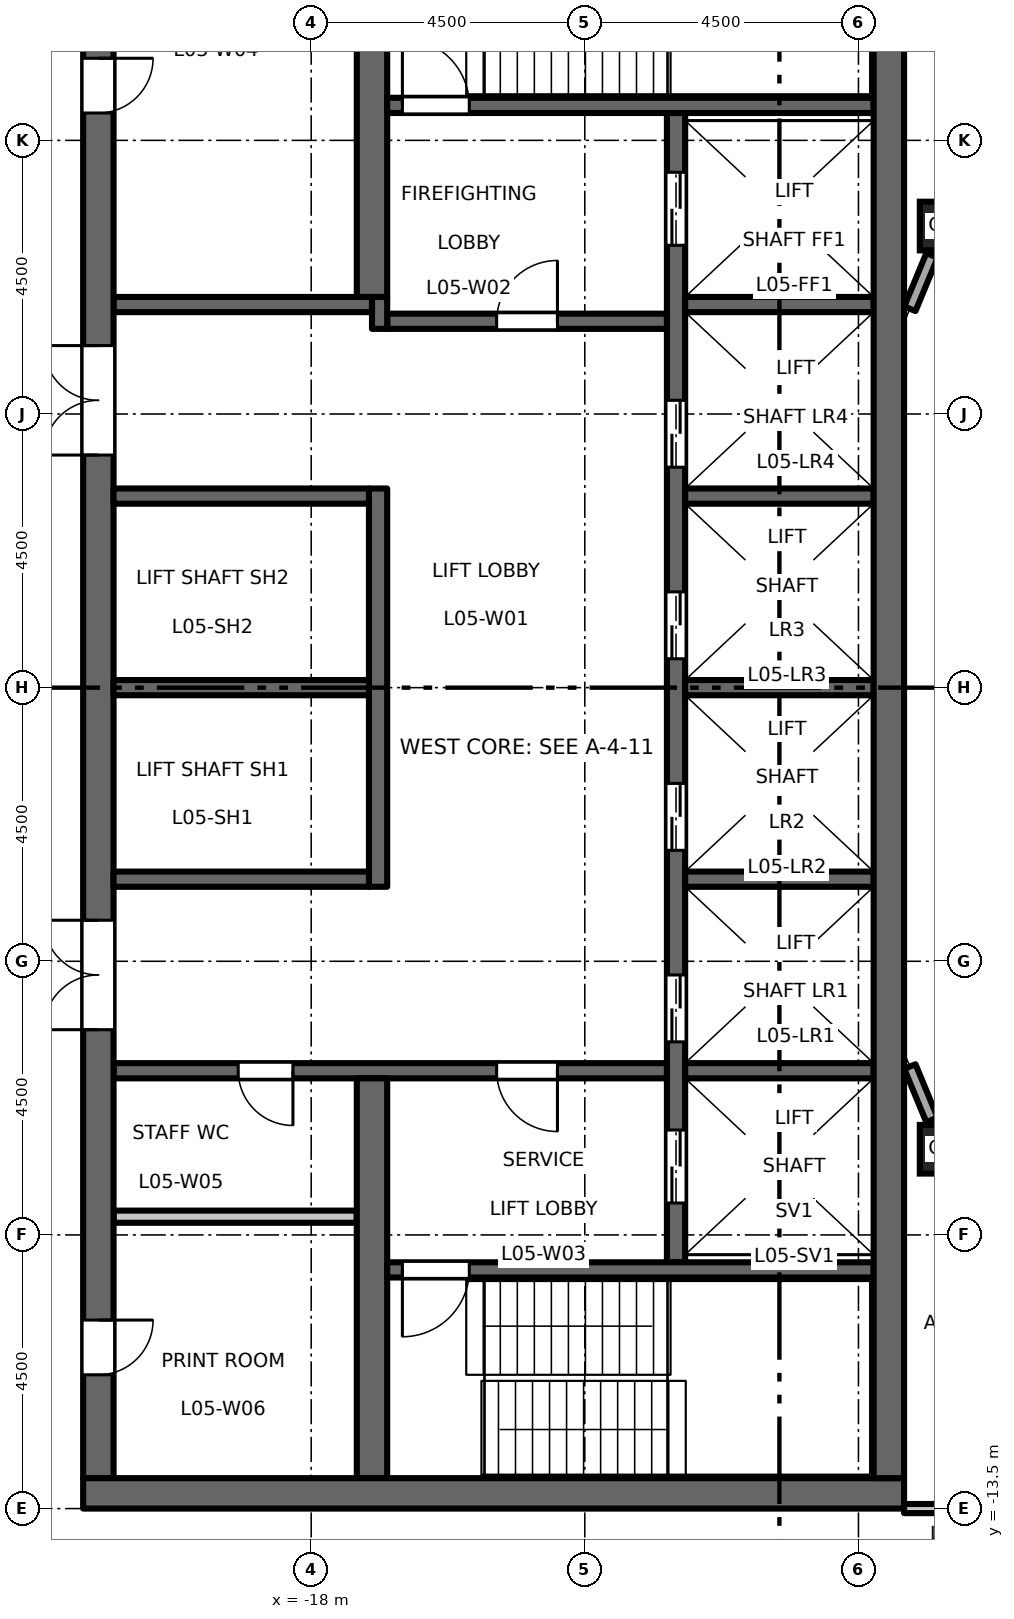
"""IFC4 building model, lengths in metres.
Left out: names, types, materials, properties, quantities, classifications, styles, units other than length and angle.
Written with IfcOpenShell. Run it as: python <this file> out.ifc"""

import sys

from ifc_helpers import new_model, si_unit, direction, frame, frame_2d, origin, origin_2d, place, context, subcontext, project, spatial, rectangle, hollow_rectangle, extrude, element, fill, save


model = new_model("IFC4")
c1 = context("Model", 3, precision=1e-05, world=origin(), true_north=direction((0.0, 1.0)))
c2 = subcontext(c1, "Body", "Model", "MODEL_VIEW")
j1 = project(units=[si_unit("LENGTHUNIT", "METRE"), si_unit("PLANEANGLEUNIT", "RADIAN")], contexts=[c1])
p1 = place(None, origin())
s1 = spatial("IfcSite", under=j1, at=p1, CompositionType="ELEMENT")
p2 = place(p1, origin())
s2 = spatial("IfcBuilding", under=s1, at=p2, CompositionType="ELEMENT")
p3 = place(p2, frame((0.0, 0.0, 26.7)))
s3 = spatial("IfcBuildingStorey", under=s2, at=p3, CompositionType="ELEMENT", Elevation=26.7)
for number, where, z_axis, x_axis in (
    (1, (-7.591, -7.591, 0.0), (0.0, 0.0, 1.0), (1.0, 0.0, 0.0)),
    (2, (-7.591, 7.591, 0.0), (0.0, 0.0, 1.0), (1.0, 0.0, 0.0)),
):
    element("IfcColumn", number, at=place(p3, frame(where, z_axis=z_axis, x_axis=x_axis)), inside=s3, PredefinedType="COLUMN", context=c2, shape_type="SweptSolid", body=[
        extrude(hollow_rectangle(XDim=0.8, YDim=0.8, WallThickness=0.05, at=origin_2d()), origin(), (0.0, 0.0, 1.0), 4.5),
    ])
p4 = place(p3, frame((-12.0, -9.45, 0.0), z_axis=(0.0, 0.0, 1.0), x_axis=(0.0, 1.0, 0.0)))
e3 = element("IfcWall", 3, at=p4, inside=s3, PredefinedType="SHEAR", context=c2, shape_type="SweptSolid", body=[
    extrude(rectangle(XDim=18.9, YDim=0.3, at=frame_2d((9.45, 0.0))), origin(), (0.0, 0.0, 1.0), 4.35),
])
p5 = place(p4, frame((3.625, 0.0, 0.0)))
e4 = element("IfcOpeningElement", 4, at=p5, cuts=e3, PredefinedType="OPENING", context=c2, shape_type="SweptSolid", body=[
    extrude(rectangle(XDim=1.1, YDim=2.1, at=frame_2d((0.55, 1.05))), frame((0.0, 0.16, 0.0), z_axis=(0.0, -1.0, 0.0), x_axis=(1.0, 0.0, 0.0)), (0.0, 0.0, 1.0), 0.32),
])
p6 = place(p4, frame((6.775, 0.0, 0.0)))
e5 = element("IfcOpeningElement", 5, at=p6, cuts=e3, PredefinedType="OPENING", context=c2, shape_type="SweptSolid", body=[
    extrude(rectangle(XDim=1.1, YDim=2.1, at=frame_2d((0.55, 1.05))), frame((0.0, 0.16, 0.0), z_axis=(0.0, -1.0, 0.0), x_axis=(1.0, 0.0, 0.0)), (0.0, 0.0, 1.0), 0.32),
])
p7 = place(p4, frame((9.925, 0.0, 0.0)))
e6 = element("IfcOpeningElement", 6, at=p7, cuts=e3, PredefinedType="OPENING", context=c2, shape_type="SweptSolid", body=[
    extrude(rectangle(XDim=1.1, YDim=2.1, at=frame_2d((0.55, 1.05))), frame((0.0, 0.16, 0.0), z_axis=(0.0, -1.0, 0.0), x_axis=(1.0, 0.0, 0.0)), (0.0, 0.0, 1.0), 0.32),
])
p8 = place(p4, frame((13.075, 0.0, 0.0)))
e7 = element("IfcOpeningElement", 7, at=p8, cuts=e3, PredefinedType="OPENING", context=c2, shape_type="SweptSolid", body=[
    extrude(rectangle(XDim=1.1, YDim=2.1, at=frame_2d((0.55, 1.05))), frame((0.0, 0.16, 0.0), z_axis=(0.0, -1.0, 0.0), x_axis=(1.0, 0.0, 0.0)), (0.0, 0.0, 1.0), 0.32),
])
p9 = place(p4, frame((16.725, 0.0, 0.0)))
e8 = element("IfcOpeningElement", 8, at=p9, cuts=e3, PredefinedType="OPENING", context=c2, shape_type="SweptSolid", body=[
    extrude(rectangle(XDim=1.2, YDim=2.1, at=frame_2d((0.6, 1.05))), frame((0.0, 0.16, 0.0), z_axis=(0.0, -1.0, 0.0), x_axis=(1.0, 0.0, 0.0)), (0.0, 0.0, 1.0), 0.32),
])
p10 = place(p4, frame((0.975, 0.0, 0.0)))
e9 = element("IfcOpeningElement", 9, at=p10, cuts=e3, PredefinedType="OPENING", context=c2, shape_type="SweptSolid", body=[
    extrude(rectangle(XDim=1.2, YDim=2.1, at=frame_2d((0.6, 1.05))), frame((0.0, 0.16, 0.0), z_axis=(0.0, -1.0, 0.0), x_axis=(1.0, 0.0, 0.0)), (0.0, 0.0, 1.0), 0.32),
])
p11 = place(p3, frame((-12.15, 6.025, 0.0), z_axis=(0.0, 0.0, 1.0), x_axis=(-1.0, 0.0, 0.0)))
e10 = element("IfcWall", 10, at=p11, inside=s3, PredefinedType="SHEAR", context=c2, shape_type="SweptSolid", body=[
    extrude(rectangle(XDim=4.6, YDim=0.25, at=frame_2d((2.3, 0.0))), origin(), (0.0, 0.0, 1.0), 4.35),
])
p12 = place(p11, frame((1.8, 0.0, 0.0)))
e11 = element("IfcOpeningElement", 11, at=p12, cuts=e10, PredefinedType="OPENING", context=c2, shape_type="SweptSolid", body=[
    extrude(rectangle(XDim=1.0, YDim=2.1, at=frame_2d((0.5, 1.05))), frame((0.0, 0.135, 0.0), z_axis=(0.0, -1.0, 0.0), x_axis=(1.0, 0.0, 0.0)), (0.0, 0.0, 1.0), 0.27),
])
p13 = place(p3, frame((-16.875, 5.9, 0.0), z_axis=(0.0, 0.0, 1.0), x_axis=(0.0, 1.0, 0.0)))
e12 = element("IfcWall", 12, at=p13, inside=s3, PredefinedType="SHEAR", context=c2, shape_type="SweptSolid", body=[
    extrude(rectangle(XDim=0.525, YDim=0.25, at=frame_2d((0.263, 0.0))), origin(), (0.0, 0.0, 1.0), 4.35),
])
p14 = place(p3, frame((-17.0, 6.3, 0.0), z_axis=(0.0, 0.0, 1.0), x_axis=(-1.0, 0.0, 0.0)))
e13 = element("IfcWall", 13, at=p14, inside=s3, PredefinedType="SHEAR", context=c2, shape_type="SweptSolid", body=[
    extrude(rectangle(XDim=4.25, YDim=0.25, at=frame_2d((2.125, 0.0))), origin(), (0.0, 0.0, 1.0), 4.35),
])
p15 = place(p3, frame((-12.15, -6.3, 0.0), z_axis=(0.0, 0.0, 1.0), x_axis=(-1.0, 0.0, 0.0)))
e14 = element("IfcWall", 14, at=p15, inside=s3, PredefinedType="SHEAR", context=c2, shape_type="SweptSolid", body=[
    extrude(rectangle(XDim=9.1, YDim=0.25, at=frame_2d((4.55, 0.0))), origin(), (0.0, 0.0, 1.0), 4.35),
])
p16 = place(p15, frame((1.8, 0.0, 0.0)))
e15 = element("IfcOpeningElement", 15, at=p16, cuts=e14, PredefinedType="OPENING", context=c2, shape_type="SweptSolid", body=[
    extrude(rectangle(XDim=1.0, YDim=2.1, at=frame_2d((0.5, 1.05))), frame((0.0, 0.135, 0.0), z_axis=(0.0, -1.0, 0.0), x_axis=(1.0, 0.0, 0.0)), (0.0, 0.0, 1.0), 0.27),
])
p17 = place(p15, frame((6.15, 0.0, 0.0)))
e16 = element("IfcOpeningElement", 16, at=p17, cuts=e14, PredefinedType="OPENING", context=c2, shape_type="SweptSolid", body=[
    extrude(rectangle(XDim=0.9, YDim=2.1, at=frame_2d((0.45, 1.05))), frame((0.0, 0.135, 0.0), z_axis=(0.0, -1.0, 0.0), x_axis=(1.0, 0.0, 0.0)), (0.0, 0.0, 1.0), 0.27),
])
p18 = place(p3, frame((-21.5, -13.0, 0.0), z_axis=(0.0, 0.0, 1.0), x_axis=(0.0, 1.0, 0.0)))
e17 = element("IfcWall", 17, at=p18, inside=s3, PredefinedType="SHEAR", context=c2, shape_type="SweptSolid", body=[
    extrude(rectangle(XDim=26.0, YDim=0.5, at=frame_2d((13.0, 0.0))), origin(), (0.0, 0.0, 1.0), 4.35),
])
p19 = place(p18, frame((16.825, 0.0, 0.0)))
e18 = element("IfcOpeningElement", 18, at=p19, cuts=e17, PredefinedType="OPENING", context=c2, shape_type="SweptSolid", body=[
    extrude(rectangle(XDim=1.8, YDim=2.1, at=frame_2d((0.9, 1.05))), frame((0.0, 0.26, 0.0), z_axis=(0.0, -1.0, 0.0), x_axis=(1.0, 0.0, 0.0)), (0.0, 0.0, 1.0), 0.52),
])
p20 = place(p18, frame((7.375, 0.0, 0.0)))
e19 = element("IfcOpeningElement", 19, at=p20, cuts=e17, PredefinedType="OPENING", context=c2, shape_type="SweptSolid", body=[
    extrude(rectangle(XDim=1.8, YDim=2.1, at=frame_2d((0.9, 1.05))), frame((0.0, 0.26, 0.0), z_axis=(0.0, -1.0, 0.0), x_axis=(1.0, 0.0, 0.0)), (0.0, 0.0, 1.0), 0.52),
])
p21 = place(p18, frame((22.45, 0.0, 0.0)))
e20 = element("IfcOpeningElement", 20, at=p21, cuts=e17, PredefinedType="OPENING", context=c2, shape_type="SweptSolid", body=[
    extrude(rectangle(XDim=0.9, YDim=2.1, at=frame_2d((0.45, 1.05))), frame((0.0, 0.26, 0.0), z_axis=(0.0, -1.0, 0.0), x_axis=(1.0, 0.0, 0.0)), (0.0, 0.0, 1.0), 0.52),
])
p22 = place(p18, frame((1.7, 0.0, 0.0)))
e21 = element("IfcOpeningElement", 21, at=p22, cuts=e17, PredefinedType="OPENING", context=c2, shape_type="SweptSolid", body=[
    extrude(rectangle(XDim=0.9, YDim=2.1, at=frame_2d((0.45, 1.05))), frame((0.0, 0.26, 0.0), z_axis=(0.0, -1.0, 0.0), x_axis=(1.0, 0.0, 0.0)), (0.0, 0.0, 1.0), 0.52),
])
p23 = place(p3, frame((-17.25, -8.7, 0.0), z_axis=(0.0, 0.0, 1.0), x_axis=(-1.0, 0.0, 0.0)))
e22 = element("IfcWall", 22, at=p23, inside=s3, PredefinedType="PARTITIONING", context=c2, shape_type="SweptSolid", body=[
    extrude(rectangle(XDim=4.0, YDim=0.2, at=frame_2d((2.0, 0.0))), origin(), (0.0, 0.0, 1.0), 4.35),
])
p24 = place(p3, frame((-16.9, -3.275, 0.0), z_axis=(0.0, 0.0, 1.0), x_axis=(0.0, 1.0, 0.0)))
e23 = element("IfcWall", 23, at=p24, inside=s3, PredefinedType="SHEAR", context=c2, shape_type="SweptSolid", body=[
    extrude(rectangle(XDim=6.55, YDim=0.3, at=frame_2d((3.275, 0.0))), origin(), (0.0, 0.0, 1.0), 4.35),
])
for number, where, z_axis, x_axis in (
    (24, (-17.05, 0.0, 0.0), (0.0, 0.0, 1.0), (-1.0, 0.0, 0.0)),
    (25, (-17.05, 3.15, 0.0), (0.0, 0.0, 1.0), (-1.0, 0.0, 0.0)),
    (26, (-17.05, -3.15, 0.0), (0.0, 0.0, 1.0), (-1.0, 0.0, 0.0)),
):
    element("IfcWall", number, at=place(p3, frame(where, z_axis=z_axis, x_axis=x_axis)), inside=s3, PredefinedType="SHEAR", context=c2, shape_type="SweptSolid", body=[
        extrude(rectangle(XDim=4.2, YDim=0.25, at=frame_2d((2.1, 0.0))), origin(), (0.0, 0.0, 1.0), 4.35),
    ])
for number, where, z_axis, x_axis in (
    (27, (-17.0, 6.425, 0.0), (0.0, 0.0, 1.0), (0.0, 1.0, 0.0)),
    (28, (-17.0, -13.0, 0.0), (0.0, 0.0, 1.0), (0.0, 1.0, 0.0)),
):
    element("IfcWall", number, at=place(p3, frame(where, z_axis=z_axis, x_axis=x_axis)), inside=s3, PredefinedType="SHEAR", context=c2, shape_type="SweptSolid", body=[
        extrude(rectangle(XDim=6.575, YDim=0.5, at=frame_2d((3.288, 0.0))), origin(), (0.0, 0.0, 1.0), 4.35),
    ])
for number, where, z_axis, x_axis in (
    (29, (-8.75, 0.0, 0.0), (0.0, 0.0, 1.0), (-1.0, 0.0, 0.0)),
    (30, (-8.75, 3.15, 0.0), (0.0, 0.0, 1.0), (-1.0, 0.0, 0.0)),
    (31, (-8.75, 6.3, 0.0), (0.0, 0.0, 1.0), (-1.0, 0.0, 0.0)),
    (32, (-8.75, -3.15, 0.0), (0.0, 0.0, 1.0), (-1.0, 0.0, 0.0)),
    (33, (-8.75, -6.3, 0.0), (0.0, 0.0, 1.0), (-1.0, 0.0, 0.0)),
):
    element("IfcWall", number, at=place(p3, frame(where, z_axis=z_axis, x_axis=x_axis)), inside=s3, PredefinedType="SHEAR", context=c2, shape_type="SweptSolid", body=[
        extrude(rectangle(XDim=3.1, YDim=0.25, at=frame_2d((1.55, 0.0))), origin(), (0.0, 0.0, 1.0), 4.35),
    ])
p25 = place(p3, frame((-8.75, 9.575, 0.0), z_axis=(0.0, 0.0, 1.0), x_axis=(-1.0, 0.0, 0.0)))
e34 = element("IfcWall", 34, at=p25, inside=s3, PredefinedType="SHEAR", context=c2, shape_type="SweptSolid", body=[
    extrude(rectangle(XDim=8.0, YDim=0.25, at=frame_2d((4.0, 0.0))), origin(), (0.0, 0.0, 1.0), 4.35),
])
p26 = place(p25, frame((6.65, 0.0, 0.0)))
e35 = element("IfcOpeningElement", 35, at=p26, cuts=e34, PredefinedType="OPENING", context=c2, shape_type="SweptSolid", body=[
    extrude(rectangle(XDim=1.1, YDim=2.1, at=frame_2d((0.55, 1.05))), frame((0.0, 0.135, 0.0), z_axis=(0.0, -1.0, 0.0), x_axis=(1.0, 0.0, 0.0)), (0.0, 0.0, 1.0), 0.27),
])
p27 = place(p3, frame((-8.75, -9.575, 0.0), z_axis=(0.0, 0.0, 1.0), x_axis=(-1.0, 0.0, 0.0)))
e36 = element("IfcWall", 36, at=p27, inside=s3, PredefinedType="SHEAR", context=c2, shape_type="SweptSolid", body=[
    extrude(rectangle(XDim=8.0, YDim=0.25, at=frame_2d((4.0, 0.0))), origin(), (0.0, 0.0, 1.0), 4.35),
])
p28 = place(p27, frame((6.65, 0.0, 0.0)))
e37 = element("IfcOpeningElement", 37, at=p28, cuts=e36, PredefinedType="OPENING", context=c2, shape_type="SweptSolid", body=[
    extrude(rectangle(XDim=1.1, YDim=2.1, at=frame_2d((0.55, 1.05))), frame((0.0, 0.135, 0.0), z_axis=(0.0, -1.0, 0.0), x_axis=(1.0, 0.0, 0.0)), (0.0, 0.0, 1.0), 0.27),
])
p29 = place(p3, frame((-8.25, -13.25, 0.0), z_axis=(0.0, 0.0, 1.0), x_axis=(-1.0, 0.0, 0.0)))
e38 = element("IfcWall", 38, at=p29, inside=s3, PredefinedType="SHEAR", context=c2, shape_type="SweptSolid", body=[
    extrude(rectangle(XDim=13.5, YDim=0.5, at=frame_2d((6.75, 0.0))), origin(), (0.0, 0.0, 1.0), 4.35),
])
p30 = place(p3, frame((-8.5, -13.0, 0.0), z_axis=(0.0, 0.0, 1.0), x_axis=(0.0, 1.0, 0.0)))
e39 = element("IfcWall", 39, at=p30, inside=s3, PredefinedType="SHEAR", context=c2, shape_type="SweptSolid", body=[
    extrude(rectangle(XDim=26.0, YDim=0.5, at=frame_2d((13.0, 0.0))), origin(), (0.0, 0.0, 1.0), 4.35),
])
for number, where, z_axis, x_axis in (
    (40, (-7.791, 7.108, 0.0), (0.0, 0.0, 1.0), (-0.383, -0.924, 0.0)),
    (41, (-8.154, -6.231, 0.0), (0.0, 0.0, 1.0), (0.383, -0.924, 0.0)),
):
    element("IfcWall", number, at=place(p3, frame(where, z_axis=z_axis, x_axis=x_axis)), inside=s3, PredefinedType="STANDARD", context=c2, shape_type="SweptSolid", body=[
        extrude(rectangle(XDim=0.949, YDim=0.2, at=frame_2d((0.475, 0.0))), origin(), (0.0, 0.0, 1.0), 3.73),
    ])
p31 = place(p3, frame((-8.25, -13.5, 0.0), z_axis=(0.0, 0.0, 1.0), x_axis=(1.0, 0.0, 0.0)))
e42 = element("IfcWall", 42, at=p31, inside=s3, PredefinedType="PARTITIONING", context=c2, shape_type="SweptSolid", body=[
    extrude(rectangle(XDim=16.5, YDim=0.15, at=frame_2d((8.25, 0.0))), origin(), (0.0, 0.0, 1.0), 3.85),
])
p32 = place(p31, frame((0.6, 0.0, 0.0)))
e43 = element("IfcOpeningElement", 43, at=p32, cuts=e42, PredefinedType="OPENING", context=c2, shape_type="SweptSolid", body=[
    extrude(rectangle(XDim=1.0, YDim=2.1, at=frame_2d((0.5, 1.05))), frame((0.0, 0.085, 0.0), z_axis=(0.0, -1.0, 0.0), x_axis=(1.0, 0.0, 0.0)), (0.0, 0.0, 1.0), 0.17),
])
p33 = place(p31, frame((14.85, 0.0, 0.0)))
e44 = element("IfcOpeningElement", 44, at=p33, cuts=e42, PredefinedType="OPENING", context=c2, shape_type="SweptSolid", body=[
    extrude(rectangle(XDim=1.0, YDim=2.1, at=frame_2d((0.5, 1.05))), frame((0.0, 0.085, 0.0), z_axis=(0.0, -1.0, 0.0), x_axis=(1.0, 0.0, 0.0)), (0.0, 0.0, 1.0), 0.17),
])
p34 = place(p12, origin())
e45 = element("IfcDoor", 45, at=p34, inside=s3, OperationType="SINGLE_SWING_LEFT", PredefinedType="DOOR", context=c2, shape_type="SweptSolid", body=[
    extrude(rectangle(XDim=1.0, YDim=2.1, at=frame_2d((0.5, 1.05))), frame((0.0, 0.025, 0.0), z_axis=(0.0, -1.0, 0.0), x_axis=(1.0, 0.0, 0.0)), (0.0, 0.0, 1.0), 0.05),
])
fill(e11, e45)
p35 = place(p16, origin())
e46 = element("IfcDoor", 46, at=p35, inside=s3, OperationType="SINGLE_SWING_RIGHT", PredefinedType="DOOR", context=c2, shape_type="SweptSolid", body=[
    extrude(rectangle(XDim=1.0, YDim=2.1, at=frame_2d((0.5, 1.05))), frame((0.0, 0.025, 0.0), z_axis=(0.0, -1.0, 0.0), x_axis=(1.0, 0.0, 0.0)), (0.0, 0.0, 1.0), 0.05),
])
fill(e15, e46)
p36 = place(p26, origin())
e47 = element("IfcDoor", 47, at=p36, inside=s3, OperationType="SINGLE_SWING_RIGHT", PredefinedType="DOOR", context=c2, shape_type="SweptSolid", body=[
    extrude(rectangle(XDim=1.1, YDim=2.1, at=frame_2d((0.55, 1.05))), frame((0.0, 0.025, 0.0), z_axis=(0.0, -1.0, 0.0), x_axis=(1.0, 0.0, 0.0)), (0.0, 0.0, 1.0), 0.05),
])
fill(e35, e47)
p37 = place(p28, origin())
e48 = element("IfcDoor", 48, at=p37, inside=s3, OperationType="SINGLE_SWING_LEFT", PredefinedType="DOOR", context=c2, shape_type="SweptSolid", body=[
    extrude(rectangle(XDim=1.1, YDim=2.1, at=frame_2d((0.55, 1.05))), frame((0.0, 0.025, 0.0), z_axis=(0.0, -1.0, 0.0), x_axis=(1.0, 0.0, 0.0)), (0.0, 0.0, 1.0), 0.05),
])
fill(e37, e48)
p38 = place(p19, origin())
e49 = element("IfcDoor", 49, at=p38, inside=s3, OperationType="DOUBLE_DOOR_DOUBLE_SWING", PredefinedType="DOOR", context=c2, shape_type="SweptSolid", body=[
    extrude(rectangle(XDim=1.8, YDim=2.1, at=frame_2d((0.9, 1.05))), frame((0.0, 0.025, 0.0), z_axis=(0.0, -1.0, 0.0), x_axis=(1.0, 0.0, 0.0)), (0.0, 0.0, 1.0), 0.05),
])
fill(e18, e49)
p39 = place(p20, origin())
e50 = element("IfcDoor", 50, at=p39, inside=s3, OperationType="DOUBLE_DOOR_DOUBLE_SWING", PredefinedType="DOOR", context=c2, shape_type="SweptSolid", body=[
    extrude(rectangle(XDim=1.8, YDim=2.1, at=frame_2d((0.9, 1.05))), frame((0.0, 0.025, 0.0), z_axis=(0.0, -1.0, 0.0), x_axis=(1.0, 0.0, 0.0)), (0.0, 0.0, 1.0), 0.05),
])
fill(e19, e50)
p40 = place(p5, origin())
e51 = element("IfcDoor", 51, at=p40, inside=s3, OperationType="DOUBLE_DOOR_SLIDING", PredefinedType="DOOR", context=c2, shape_type="SweptSolid", body=[
    extrude(rectangle(XDim=1.1, YDim=2.1, at=frame_2d((0.55, 1.05))), frame((0.0, 0.025, 0.0), z_axis=(0.0, -1.0, 0.0), x_axis=(1.0, 0.0, 0.0)), (0.0, 0.0, 1.0), 0.05),
])
fill(e4, e51)
p41 = place(p6, origin())
e52 = element("IfcDoor", 52, at=p41, inside=s3, OperationType="DOUBLE_DOOR_SLIDING", PredefinedType="DOOR", context=c2, shape_type="SweptSolid", body=[
    extrude(rectangle(XDim=1.1, YDim=2.1, at=frame_2d((0.55, 1.05))), frame((0.0, 0.025, 0.0), z_axis=(0.0, -1.0, 0.0), x_axis=(1.0, 0.0, 0.0)), (0.0, 0.0, 1.0), 0.05),
])
fill(e5, e52)
p42 = place(p7, origin())
e53 = element("IfcDoor", 53, at=p42, inside=s3, OperationType="DOUBLE_DOOR_SLIDING", PredefinedType="DOOR", context=c2, shape_type="SweptSolid", body=[
    extrude(rectangle(XDim=1.1, YDim=2.1, at=frame_2d((0.55, 1.05))), frame((0.0, 0.025, 0.0), z_axis=(0.0, -1.0, 0.0), x_axis=(1.0, 0.0, 0.0)), (0.0, 0.0, 1.0), 0.05),
])
fill(e6, e53)
p43 = place(p8, origin())
e54 = element("IfcDoor", 54, at=p43, inside=s3, OperationType="DOUBLE_DOOR_SLIDING", PredefinedType="DOOR", context=c2, shape_type="SweptSolid", body=[
    extrude(rectangle(XDim=1.1, YDim=2.1, at=frame_2d((0.55, 1.05))), frame((0.0, 0.025, 0.0), z_axis=(0.0, -1.0, 0.0), x_axis=(1.0, 0.0, 0.0)), (0.0, 0.0, 1.0), 0.05),
])
fill(e7, e54)
p44 = place(p9, origin())
e55 = element("IfcDoor", 55, at=p44, inside=s3, OperationType="DOUBLE_DOOR_SLIDING", PredefinedType="DOOR", context=c2, shape_type="SweptSolid", body=[
    extrude(rectangle(XDim=1.2, YDim=2.1, at=frame_2d((0.6, 1.05))), frame((0.0, 0.025, 0.0), z_axis=(0.0, -1.0, 0.0), x_axis=(1.0, 0.0, 0.0)), (0.0, 0.0, 1.0), 0.05),
])
fill(e8, e55)
p45 = place(p10, origin())
e56 = element("IfcDoor", 56, at=p45, inside=s3, OperationType="DOUBLE_DOOR_SLIDING", PredefinedType="DOOR", context=c2, shape_type="SweptSolid", body=[
    extrude(rectangle(XDim=1.2, YDim=2.1, at=frame_2d((0.6, 1.05))), frame((0.0, 0.025, 0.0), z_axis=(0.0, -1.0, 0.0), x_axis=(1.0, 0.0, 0.0)), (0.0, 0.0, 1.0), 0.05),
])
fill(e9, e56)
p46 = place(p21, origin())
e57 = element("IfcDoor", 57, at=p46, inside=s3, OperationType="SINGLE_SWING_RIGHT", PredefinedType="DOOR", context=c2, shape_type="SweptSolid", body=[
    extrude(rectangle(XDim=0.9, YDim=2.1, at=frame_2d((0.45, 1.05))), frame((0.0, 0.025, 0.0), z_axis=(0.0, -1.0, 0.0), x_axis=(1.0, 0.0, 0.0)), (0.0, 0.0, 1.0), 0.05),
])
fill(e20, e57)
p47 = place(p17, origin())
e58 = element("IfcDoor", 58, at=p47, inside=s3, OperationType="SINGLE_SWING_RIGHT", PredefinedType="DOOR", context=c2, shape_type="SweptSolid", body=[
    extrude(rectangle(XDim=0.9, YDim=2.1, at=frame_2d((0.45, 1.05))), frame((0.0, 0.025, 0.0), z_axis=(0.0, -1.0, 0.0), x_axis=(1.0, 0.0, 0.0)), (0.0, 0.0, 1.0), 0.05),
])
fill(e16, e58)
p48 = place(p22, origin())
e59 = element("IfcDoor", 59, at=p48, inside=s3, OperationType="SINGLE_SWING_RIGHT", PredefinedType="DOOR", context=c2, shape_type="SweptSolid", body=[
    extrude(rectangle(XDim=0.9, YDim=2.1, at=frame_2d((0.45, 1.05))), frame((0.0, 0.025, 0.0), z_axis=(0.0, -1.0, 0.0), x_axis=(1.0, 0.0, 0.0)), (0.0, 0.0, 1.0), 0.05),
])
fill(e21, e59)
save(model, sys.argv[1])
